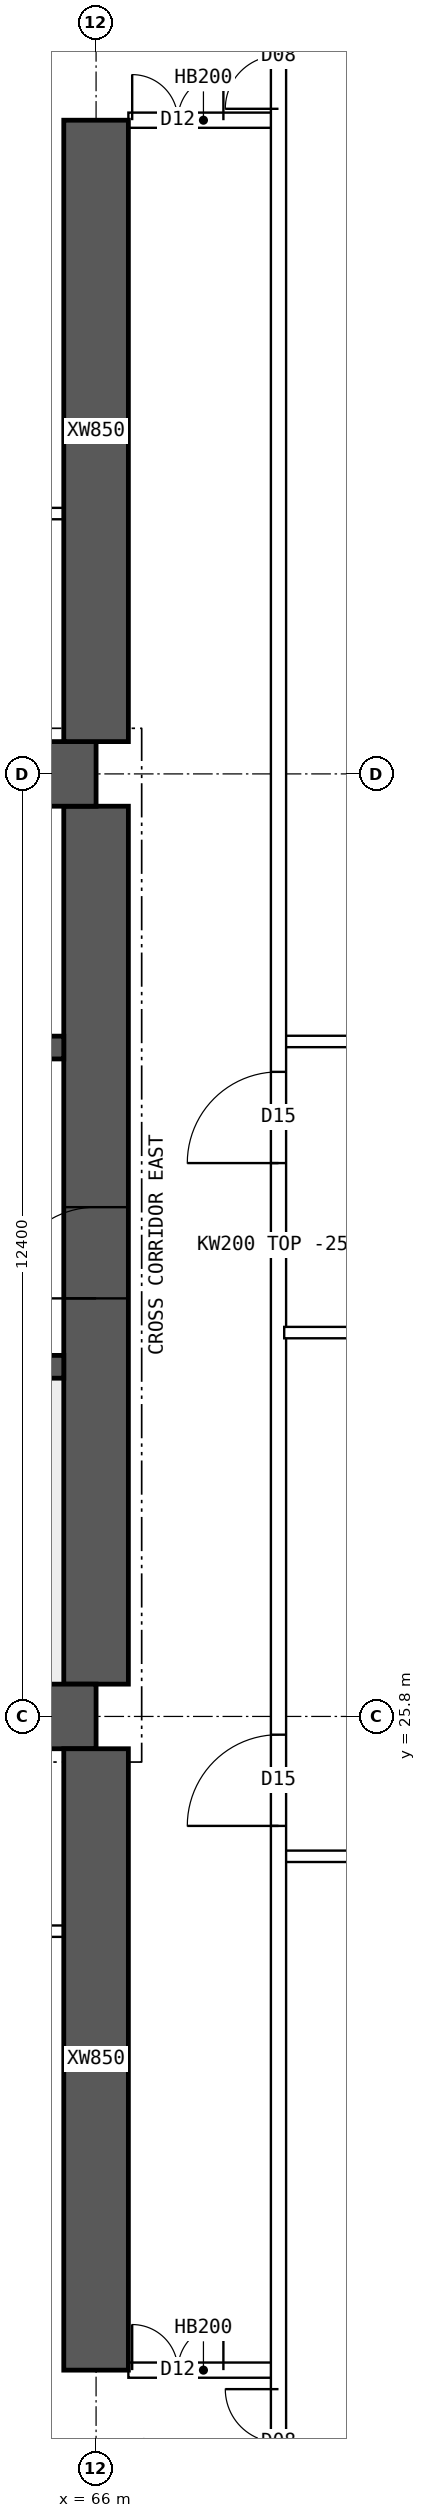
"""IFC4 building model, lengths in metres.
Left out: names, types, materials, properties, quantities, classifications, styles, units other than length and angle.
Written with IfcOpenShell. Run it as: python <this file> out.ifc"""

import sys

from ifc_helpers import new_model, si_unit, direction, frame, frame_2d, origin, place, context, subcontext, project, spatial, polyline, rectangle, outline, extrude, element, fill, save


model = new_model("IFC4")
c1 = context("Model", 3, precision=1e-05, world=origin(), true_north=direction((0.0, 1.0)))
c2 = subcontext(c1, "Body", "Model", "MODEL_VIEW")
j1 = project(units=[si_unit("LENGTHUNIT", "METRE"), si_unit("PLANEANGLEUNIT", "RADIAN")], contexts=[c1])
p1 = place(None, origin())
s1 = spatial("IfcSite", under=j1, at=p1, CompositionType="ELEMENT")
p2 = place(p1, origin())
s2 = spatial("IfcBuilding", under=s1, at=p2, CompositionType="ELEMENT")
p3 = place(p2, frame((0.0, 0.0, 156.1)))
s3 = spatial("IfcBuildingStorey", under=s2, at=p3, CompositionType="ELEMENT", Elevation=156.1)
for number, where, z_axis, x_axis in (
    (1, (18.0, 25.8, 0.0), (0.0, 0.0, 1.0), (1.0, 0.0, 0.0)),
    (2, (18.0, 38.2, 0.0), (0.0, 0.0, 1.0), (1.0, 0.0, 0.0)),
):
    element("IfcWall", number, at=place(p3, frame(where, z_axis=z_axis, x_axis=x_axis)), inside=s3, PredefinedType="SHEAR", context=c2, shape_type="SweptSolid", body=[
        extrude(rectangle(XDim=48.0, YDim=0.85, at=frame_2d((24.0, 0.0))), origin(), (0.0, 0.0, 1.0), 3.75),
    ])
p4 = place(p3, frame((66.0, 26.225, 0.0), z_axis=(0.0, 0.0, 1.0), x_axis=(0.0, 1.0, 0.0)))
e3 = element("IfcWall", 3, at=p4, inside=s3, PredefinedType="SHEAR", context=c2, shape_type="SweptSolid", body=[
    extrude(rectangle(XDim=11.55, YDim=0.85, at=frame_2d((5.775, 0.0))), origin(), (0.0, 0.0, 1.0), 3.75),
])
p5 = place(p4, frame((5.075, 0.0, 0.0)))
e4 = element("IfcOpeningElement", 4, at=p5, cuts=e3, PredefinedType="OPENING", context=c2, shape_type="SweptSolid", body=[
    extrude(rectangle(XDim=1.2, YDim=2.1, at=frame_2d((0.6, 1.05))), frame((0.0, 0.435, 0.0), z_axis=(0.0, -1.0, 0.0), x_axis=(1.0, 0.0, 0.0)), (0.0, 0.0, 1.0), 0.87),
])
p6 = place(p3, frame((18.425, 30.4, 0.0), z_axis=(0.0, 0.0, 1.0), x_axis=(1.0, 0.0, 0.0)))
e5 = element("IfcWall", 5, at=p6, inside=s3, PredefinedType="SHEAR", context=c2, shape_type="SweptSolid", body=[
    extrude(rectangle(XDim=47.15, YDim=0.3, at=frame_2d((23.575, 0.0))), origin(), (0.0, 0.0, 1.0), 3.75),
])
p7 = place(p6, frame((0.4, 0.0, 0.0)))
e6 = element("IfcOpeningElement", 6, at=p7, cuts=e5, PredefinedType="OPENING", context=c2, shape_type="SweptSolid", body=[
    extrude(rectangle(XDim=1.0, YDim=2.1, at=frame_2d((0.5, 1.05))), frame((0.0, 0.16, 0.0), z_axis=(0.0, -1.0, 0.0), x_axis=(1.0, 0.0, 0.0)), (0.0, 0.0, 1.0), 0.32),
])
p8 = place(p6, frame((45.75, 0.0, 0.0)))
e7 = element("IfcOpeningElement", 7, at=p8, cuts=e5, PredefinedType="OPENING", context=c2, shape_type="SweptSolid", body=[
    extrude(rectangle(XDim=1.0, YDim=2.1, at=frame_2d((0.5, 1.05))), frame((0.0, 0.16, 0.0), z_axis=(0.0, -1.0, 0.0), x_axis=(1.0, 0.0, 0.0)), (0.0, 0.0, 1.0), 0.32),
])
p9 = place(p6, frame((8.325, 0.0, 0.0)))
e8 = element("IfcOpeningElement", 8, at=p9, cuts=e5, PredefinedType="OPENING", context=c2, shape_type="SweptSolid", body=[
    extrude(rectangle(XDim=1.1, YDim=2.1, at=frame_2d((0.55, 1.05))), frame((0.0, 0.16, 0.0), z_axis=(0.0, -1.0, 0.0), x_axis=(1.0, 0.0, 0.0)), (0.0, 0.0, 1.0), 0.32),
])
p10 = place(p6, frame((10.925, 0.0, 0.0)))
e9 = element("IfcOpeningElement", 9, at=p10, cuts=e5, PredefinedType="OPENING", context=c2, shape_type="SweptSolid", body=[
    extrude(rectangle(XDim=1.1, YDim=2.1, at=frame_2d((0.55, 1.05))), frame((0.0, 0.16, 0.0), z_axis=(0.0, -1.0, 0.0), x_axis=(1.0, 0.0, 0.0)), (0.0, 0.0, 1.0), 0.32),
])
p11 = place(p6, frame((13.525, 0.0, 0.0)))
e10 = element("IfcOpeningElement", 10, at=p11, cuts=e5, PredefinedType="OPENING", context=c2, shape_type="SweptSolid", body=[
    extrude(rectangle(XDim=1.1, YDim=2.1, at=frame_2d((0.55, 1.05))), frame((0.0, 0.16, 0.0), z_axis=(0.0, -1.0, 0.0), x_axis=(1.0, 0.0, 0.0)), (0.0, 0.0, 1.0), 0.32),
])
p12 = place(p6, frame((16.125, 0.0, 0.0)))
e11 = element("IfcOpeningElement", 11, at=p12, cuts=e5, PredefinedType="OPENING", context=c2, shape_type="SweptSolid", body=[
    extrude(rectangle(XDim=1.1, YDim=2.1, at=frame_2d((0.55, 1.05))), frame((0.0, 0.16, 0.0), z_axis=(0.0, -1.0, 0.0), x_axis=(1.0, 0.0, 0.0)), (0.0, 0.0, 1.0), 0.32),
])
p13 = place(p6, frame((18.9, 0.0, 0.0)))
e12 = element("IfcOpeningElement", 12, at=p13, cuts=e5, PredefinedType="OPENING", context=c2, shape_type="SweptSolid", body=[
    extrude(rectangle(XDim=0.9, YDim=2.1, at=frame_2d((0.45, 1.05))), frame((0.0, 0.16, 0.0), z_axis=(0.0, -1.0, 0.0), x_axis=(1.0, 0.0, 0.0)), (0.0, 0.0, 1.0), 0.32),
])
p14 = place(p6, frame((30.192, 0.0, 0.0)))
e13 = element("IfcOpeningElement", 13, at=p14, cuts=e5, PredefinedType="OPENING", context=c2, shape_type="SweptSolid", body=[
    extrude(rectangle(XDim=1.1, YDim=2.1, at=frame_2d((0.55, 1.05))), frame((0.0, 0.16, 0.0), z_axis=(0.0, -1.0, 0.0), x_axis=(1.0, 0.0, 0.0)), (0.0, 0.0, 1.0), 0.32),
])
p15 = place(p6, frame((33.725, 0.0, 0.0)))
e14 = element("IfcOpeningElement", 14, at=p15, cuts=e5, PredefinedType="OPENING", context=c2, shape_type="SweptSolid", body=[
    extrude(rectangle(XDim=1.1, YDim=2.1, at=frame_2d((0.55, 1.05))), frame((0.0, 0.16, 0.0), z_axis=(0.0, -1.0, 0.0), x_axis=(1.0, 0.0, 0.0)), (0.0, 0.0, 1.0), 0.32),
])
p16 = place(p6, frame((37.258, 0.0, 0.0)))
e15 = element("IfcOpeningElement", 15, at=p16, cuts=e5, PredefinedType="OPENING", context=c2, shape_type="SweptSolid", body=[
    extrude(rectangle(XDim=1.1, YDim=2.1, at=frame_2d((0.55, 1.05))), frame((0.0, 0.16, 0.0), z_axis=(0.0, -1.0, 0.0), x_axis=(1.0, 0.0, 0.0)), (0.0, 0.0, 1.0), 0.32),
])
p17 = place(p3, frame((18.425, 34.6, 0.0), z_axis=(0.0, 0.0, 1.0), x_axis=(1.0, 0.0, 0.0)))
e16 = element("IfcWall", 16, at=p17, inside=s3, PredefinedType="SHEAR", context=c2, shape_type="SweptSolid", body=[
    extrude(rectangle(XDim=47.15, YDim=0.3, at=frame_2d((23.575, 0.0))), origin(), (0.0, 0.0, 1.0), 3.75),
])
p18 = place(p17, frame((0.9, 0.0, 0.0)))
e17 = element("IfcOpeningElement", 17, at=p18, cuts=e16, PredefinedType="OPENING", context=c2, shape_type="SweptSolid", body=[
    extrude(rectangle(XDim=1.1, YDim=2.1, at=frame_2d((0.55, 1.05))), frame((0.0, 0.16, 0.0), z_axis=(0.0, -1.0, 0.0), x_axis=(1.0, 0.0, 0.0)), (0.0, 0.0, 1.0), 0.32),
])
p19 = place(p17, frame((45.15, 0.0, 0.0)))
e18 = element("IfcOpeningElement", 18, at=p19, cuts=e16, PredefinedType="OPENING", context=c2, shape_type="SweptSolid", body=[
    extrude(rectangle(XDim=1.1, YDim=2.1, at=frame_2d((0.55, 1.05))), frame((0.0, 0.16, 0.0), z_axis=(0.0, -1.0, 0.0), x_axis=(1.0, 0.0, 0.0)), (0.0, 0.0, 1.0), 0.32),
])
p20 = place(p17, frame((4.175, 0.0, 0.0)))
e19 = element("IfcOpeningElement", 19, at=p20, cuts=e16, PredefinedType="OPENING", context=c2, shape_type="SweptSolid", body=[
    extrude(rectangle(XDim=0.9, YDim=2.1, at=frame_2d((0.45, 1.05))), frame((0.0, 0.16, 0.0), z_axis=(0.0, -1.0, 0.0), x_axis=(1.0, 0.0, 0.0)), (0.0, 0.0, 1.0), 0.32),
])
p21 = place(p17, frame((42.075, 0.0, 0.0)))
e20 = element("IfcOpeningElement", 20, at=p21, cuts=e16, PredefinedType="OPENING", context=c2, shape_type="SweptSolid", body=[
    extrude(rectangle(XDim=0.9, YDim=2.1, at=frame_2d((0.45, 1.05))), frame((0.0, 0.16, 0.0), z_axis=(0.0, -1.0, 0.0), x_axis=(1.0, 0.0, 0.0)), (0.0, 0.0, 1.0), 0.32),
])
p22 = place(p17, frame((8.95, 0.0, 0.0)))
e21 = element("IfcOpeningElement", 21, at=p22, cuts=e16, PredefinedType="OPENING", context=c2, shape_type="SweptSolid", body=[
    extrude(rectangle(XDim=0.9, YDim=2.1, at=frame_2d((0.45, 1.05))), frame((0.0, 0.16, 0.0), z_axis=(0.0, -1.0, 0.0), x_axis=(1.0, 0.0, 0.0)), (0.0, 0.0, 1.0), 0.32),
])
p23 = place(p17, frame((12.924, 0.0, 0.0)))
e22 = element("IfcOpeningElement", 22, at=p23, cuts=e16, PredefinedType="OPENING", context=c2, shape_type="SweptSolid", body=[
    extrude(rectangle(XDim=0.9, YDim=2.1, at=frame_2d((0.45, 1.05))), frame((0.0, 0.16, 0.0), z_axis=(0.0, -1.0, 0.0), x_axis=(1.0, 0.0, 0.0)), (0.0, 0.0, 1.0), 0.32),
])
p24 = place(p17, frame((16.571, 0.0, 0.0)))
e23 = element("IfcOpeningElement", 23, at=p24, cuts=e16, PredefinedType="OPENING", context=c2, shape_type="SweptSolid", body=[
    extrude(rectangle(XDim=0.9, YDim=2.1, at=frame_2d((0.45, 1.05))), frame((0.0, 0.16, 0.0), z_axis=(0.0, -1.0, 0.0), x_axis=(1.0, 0.0, 0.0)), (0.0, 0.0, 1.0), 0.32),
])
p25 = place(p17, frame((20.33, 0.0, 0.0)))
e24 = element("IfcOpeningElement", 24, at=p25, cuts=e16, PredefinedType="OPENING", context=c2, shape_type="SweptSolid", body=[
    extrude(rectangle(XDim=0.9, YDim=2.1, at=frame_2d((0.45, 1.05))), frame((0.0, 0.16, 0.0), z_axis=(0.0, -1.0, 0.0), x_axis=(1.0, 0.0, 0.0)), (0.0, 0.0, 1.0), 0.32),
])
p26 = place(p17, frame((24.736, 0.0, 0.0)))
e25 = element("IfcOpeningElement", 25, at=p26, cuts=e16, PredefinedType="OPENING", context=c2, shape_type="SweptSolid", body=[
    extrude(rectangle(XDim=0.9, YDim=2.1, at=frame_2d((0.45, 1.05))), frame((0.0, 0.16, 0.0), z_axis=(0.0, -1.0, 0.0), x_axis=(1.0, 0.0, 0.0)), (0.0, 0.0, 1.0), 0.32),
])
p27 = place(p17, frame((27.533, 0.0, 0.0)))
e26 = element("IfcOpeningElement", 26, at=p27, cuts=e16, PredefinedType="OPENING", context=c2, shape_type="SweptSolid", body=[
    extrude(rectangle(XDim=0.9, YDim=2.1, at=frame_2d((0.45, 1.05))), frame((0.0, 0.16, 0.0), z_axis=(0.0, -1.0, 0.0), x_axis=(1.0, 0.0, 0.0)), (0.0, 0.0, 1.0), 0.32),
])
p28 = place(p17, frame((29.906, 0.0, 0.0)))
e27 = element("IfcOpeningElement", 27, at=p28, cuts=e16, PredefinedType="OPENING", context=c2, shape_type="SweptSolid", body=[
    extrude(rectangle(XDim=0.9, YDim=2.1, at=frame_2d((0.45, 1.05))), frame((0.0, 0.16, 0.0), z_axis=(0.0, -1.0, 0.0), x_axis=(1.0, 0.0, 0.0)), (0.0, 0.0, 1.0), 0.32),
])
p29 = place(p17, frame((35.376, 0.0, 0.0)))
e28 = element("IfcOpeningElement", 28, at=p29, cuts=e16, PredefinedType="OPENING", context=c2, shape_type="SweptSolid", body=[
    extrude(rectangle(XDim=0.9, YDim=2.1, at=frame_2d((0.45, 1.05))), frame((0.0, 0.16, 0.0), z_axis=(0.0, -1.0, 0.0), x_axis=(1.0, 0.0, 0.0)), (0.0, 0.0, 1.0), 0.32),
])
for number, where, z_axis, x_axis in (
    (29, (66.0, 17.2, 0.0), (0.0, 0.0, 1.0), (0.0, 1.0, 0.0)),
    (30, (66.0, 38.625, 0.0), (0.0, 0.0, 1.0), (0.0, 1.0, 0.0)),
):
    element("IfcWall", number, at=place(p3, frame(where, z_axis=z_axis, x_axis=x_axis)), inside=s3, PredefinedType="SHEAR", context=c2, shape_type="SweptSolid", body=[
        extrude(rectangle(XDim=8.175, YDim=0.85, at=frame_2d((4.087, 0.0))), origin(), (0.0, 0.0, 1.0), 3.75),
    ])
p30 = place(p3, frame((66.425, 17.2, 0.0), z_axis=(0.0, 0.0, 1.0), x_axis=(1.0, 0.0, 0.0)))
e31 = element("IfcWall", 31, at=p30, inside=s3, PredefinedType="SOLIDWALL", context=c2, shape_type="SweptSolid", body=[
    extrude(rectangle(XDim=1.975, YDim=0.2, at=frame_2d((0.987, 0.0))), origin(), (0.0, 0.0, 1.0), 3.5),
])
p31 = place(p30, frame((0.05, 0.0, 0.0)))
e32 = element("IfcOpeningElement", 32, at=p31, cuts=e31, PredefinedType="OPENING", context=c2, shape_type="SweptSolid", body=[
    extrude(rectangle(XDim=1.2, YDim=2.1, at=frame_2d((0.6, 1.05))), frame((0.0, 0.11, 0.0), z_axis=(0.0, -1.0, 0.0), x_axis=(1.0, 0.0, 0.0)), (0.0, 0.0, 1.0), 0.22),
])
p32 = place(p3, frame((66.425, 46.8, 0.0), z_axis=(0.0, 0.0, 1.0), x_axis=(1.0, 0.0, 0.0)))
e33 = element("IfcWall", 33, at=p32, inside=s3, PredefinedType="SOLIDWALL", context=c2, shape_type="SweptSolid", body=[
    extrude(rectangle(XDim=1.975, YDim=0.2, at=frame_2d((0.987, 0.0))), origin(), (0.0, 0.0, 1.0), 3.5),
])
p33 = place(p32, frame((0.05, 0.0, 0.0)))
e34 = element("IfcOpeningElement", 34, at=p33, cuts=e33, PredefinedType="OPENING", context=c2, shape_type="SweptSolid", body=[
    extrude(rectangle(XDim=1.2, YDim=2.1, at=frame_2d((0.6, 1.05))), frame((0.0, 0.11, 0.0), z_axis=(0.0, -1.0, 0.0), x_axis=(1.0, 0.0, 0.0)), (0.0, 0.0, 1.0), 0.22),
])
p34 = place(p3, frame((60.075, 22.975, 0.0), z_axis=(0.0, 0.0, 1.0), x_axis=(1.0, 0.0, 0.0)))
e35 = element("IfcWall", 35, at=p34, inside=s3, PredefinedType="PARTITIONING", context=c2, shape_type="SweptSolid", body=[
    extrude(rectangle(XDim=5.5, YDim=0.15, at=frame_2d((2.75, 0.0))), origin(), (0.0, 0.0, 1.0), 3.5),
])
p35 = place(p34, frame((0.4, 0.0, 0.0)))
e36 = element("IfcOpeningElement", 36, at=p35, cuts=e35, PredefinedType="OPENING", context=c2, shape_type="SweptSolid", body=[
    extrude(rectangle(XDim=1.0, YDim=2.1, at=frame_2d((0.5, 1.05))), frame((0.0, 0.085, 0.0), z_axis=(0.0, -1.0, 0.0), x_axis=(1.0, 0.0, 0.0)), (0.0, 0.0, 1.0), 0.17),
])
p36 = place(p3, frame((65.575, 41.625, 0.0), z_axis=(0.0, 0.0, 1.0), x_axis=(-1.0, 0.0, 0.0)))
e37 = element("IfcWall", 37, at=p36, inside=s3, PredefinedType="PARTITIONING", context=c2, shape_type="SweptSolid", body=[
    extrude(rectangle(XDim=5.5, YDim=0.15, at=frame_2d((2.75, 0.0))), origin(), (0.0, 0.0, 1.0), 3.5),
])
p37 = place(p36, frame((0.4, 0.0, 0.0)))
e38 = element("IfcOpeningElement", 38, at=p37, cuts=e37, PredefinedType="OPENING", context=c2, shape_type="SweptSolid", body=[
    extrude(rectangle(XDim=1.0, YDim=2.1, at=frame_2d((0.5, 1.05))), frame((0.0, 0.085, 0.0), z_axis=(0.0, -1.0, 0.0), x_axis=(1.0, 0.0, 0.0)), (0.0, 0.0, 1.0), 0.17),
])
p38 = place(p3, frame((68.475, 30.85, 0.0), z_axis=(0.0, 0.0, 1.0), x_axis=(1.0, 0.0, 0.0)))
e39 = element("IfcWall", 39, at=p38, inside=s3, PredefinedType="PARTITIONING", context=c2, shape_type="SweptSolid", body=[
    extrude(outline(polyline([(0.0, 0.0), (6.82, 0.0), (6.82, 3.5), (3.827, 3.5), (3.825, 3.05), (3.227, 3.05), (3.225, 3.5), (0.0, 3.5), (0.0, 0.0)])), frame((0.0, 0.075, 0.0), z_axis=(0.0, -1.0, 0.0), x_axis=(1.0, 0.0, 0.0)), (0.0, 0.0, 1.0), 0.15),
])
p39 = place(p3, frame((68.4, 10.446, 0.0), z_axis=(0.0, 0.0, 1.0), x_axis=(0.0, 1.0, 0.0)))
e40 = element("IfcWall", 40, at=p39, inside=s3, PredefinedType="SOLIDWALL", context=c2, shape_type="SweptSolid", body=[
    extrude(rectangle(XDim=43.107, YDim=0.2, at=frame_2d((21.554, 0.0))), origin(), (0.0, 0.0, 1.0), 3.5),
])
p40 = place(p39, frame((13.914, 0.0, 0.0)))
e41 = element("IfcOpeningElement", 41, at=p40, cuts=e40, PredefinedType="OPENING", context=c2, shape_type="SweptSolid", body=[
    extrude(rectangle(XDim=1.2, YDim=2.1, at=frame_2d((0.6, 1.05))), frame((0.0, 0.11, 0.0), z_axis=(0.0, -1.0, 0.0), x_axis=(1.0, 0.0, 0.0)), (0.0, 0.0, 1.0), 0.22),
])
p41 = place(p39, frame((22.634, 0.0, 0.0)))
e42 = element("IfcOpeningElement", 42, at=p41, cuts=e40, PredefinedType="OPENING", context=c2, shape_type="SweptSolid", body=[
    extrude(rectangle(XDim=1.2, YDim=2.1, at=frame_2d((0.6, 1.05))), frame((0.0, 0.11, 0.0), z_axis=(0.0, -1.0, 0.0), x_axis=(1.0, 0.0, 0.0)), (0.0, 0.0, 1.0), 0.22),
])
p42 = place(p39, frame((5.104, 0.0, 0.0)))
e43 = element("IfcOpeningElement", 43, at=p42, cuts=e40, PredefinedType="OPENING", context=c2, shape_type="SweptSolid", body=[
    extrude(rectangle(XDim=1.4, YDim=2.1, at=frame_2d((0.7, 1.05))), frame((0.0, 0.11, 0.0), z_axis=(0.0, -1.0, 0.0), x_axis=(1.0, 0.0, 0.0)), (0.0, 0.0, 1.0), 0.22),
])
p43 = place(p39, frame((36.504, 0.0, 0.0)))
e44 = element("IfcOpeningElement", 44, at=p43, cuts=e40, PredefinedType="OPENING", context=c2, shape_type="SweptSolid", body=[
    extrude(rectangle(XDim=1.4, YDim=2.1, at=frame_2d((0.7, 1.05))), frame((0.0, 0.11, 0.0), z_axis=(0.0, -1.0, 0.0), x_axis=(1.0, 0.0, 0.0)), (0.0, 0.0, 1.0), 0.22),
])
p44 = place(p3, frame((68.475, 23.96, 0.0), z_axis=(0.0, 0.0, 1.0), x_axis=(1.0, 0.0, 0.0)))
e45 = element("IfcWall", 45, at=p44, inside=s3, PredefinedType="PARTITIONING", context=c2, shape_type="SweptSolid", body=[
    extrude(rectangle(XDim=6.82, YDim=0.15, at=frame_2d((3.41, 0.0))), origin(), (0.0, 0.0, 1.0), 3.5),
])
p45 = place(p3, frame((68.475, 34.68, 0.0), z_axis=(0.0, 0.0, 1.0), x_axis=(1.0, 0.0, 0.0)))
e46 = element("IfcWall", 46, at=p45, inside=s3, PredefinedType="PARTITIONING", context=c2, shape_type="SweptSolid", body=[
    extrude(outline(polyline([(0.0, 0.0), (6.82, 0.0), (6.82, 3.5), (3.827, 3.5), (3.825, 3.05), (3.227, 3.05), (3.225, 3.5), (0.0, 3.5), (0.0, 0.0)])), frame((0.0, 0.075, 0.0), z_axis=(0.0, -1.0, 0.0), x_axis=(1.0, 0.0, 0.0)), (0.0, 0.0, 1.0), 0.15),
])
p46 = place(p5, origin())
e47 = element("IfcDoor", 47, at=p46, inside=s3, OperationType="SINGLE_SWING_LEFT", PredefinedType="DOOR", context=c2, shape_type="SweptSolid", body=[
    extrude(rectangle(XDim=1.2, YDim=2.1, at=frame_2d((0.6, 1.05))), frame((0.0, 0.025, 0.0), z_axis=(0.0, -1.0, 0.0), x_axis=(1.0, 0.0, 0.0)), (0.0, 0.0, 1.0), 0.05),
])
fill(e4, e47)
p47 = place(p31, origin())
e48 = element("IfcDoor", 48, at=p47, inside=s3, OperationType="DOUBLE_DOOR_SINGLE_SWING", PredefinedType="DOOR", context=c2, shape_type="SweptSolid", body=[
    extrude(rectangle(XDim=1.2, YDim=2.1, at=frame_2d((0.6, 1.05))), frame((0.0, 0.025, 0.0), z_axis=(0.0, -1.0, 0.0), x_axis=(1.0, 0.0, 0.0)), (0.0, 0.0, 1.0), 0.05),
])
fill(e32, e48)
p48 = place(p33, origin())
e49 = element("IfcDoor", 49, at=p48, inside=s3, OperationType="DOUBLE_DOOR_SINGLE_SWING", PredefinedType="DOOR", context=c2, shape_type="SweptSolid", body=[
    extrude(rectangle(XDim=1.2, YDim=2.1, at=frame_2d((0.6, 1.05))), frame((0.0, 0.025, 0.0), z_axis=(0.0, -1.0, 0.0), x_axis=(1.0, 0.0, 0.0)), (0.0, 0.0, 1.0), 0.05),
])
fill(e34, e49)
p49 = place(p40, origin())
e50 = element("IfcDoor", 50, at=p49, inside=s3, OperationType="SINGLE_SWING_LEFT", PredefinedType="DOOR", context=c2, shape_type="SweptSolid", body=[
    extrude(rectangle(XDim=1.2, YDim=2.1, at=frame_2d((0.6, 1.05))), frame((0.0, 0.025, 0.0), z_axis=(0.0, -1.0, 0.0), x_axis=(1.0, 0.0, 0.0)), (0.0, 0.0, 1.0), 0.05),
])
fill(e41, e50)
p50 = place(p41, origin())
e51 = element("IfcDoor", 51, at=p50, inside=s3, OperationType="SINGLE_SWING_LEFT", PredefinedType="DOOR", context=c2, shape_type="SweptSolid", body=[
    extrude(rectangle(XDim=1.2, YDim=2.1, at=frame_2d((0.6, 1.05))), frame((0.0, 0.025, 0.0), z_axis=(0.0, -1.0, 0.0), x_axis=(1.0, 0.0, 0.0)), (0.0, 0.0, 1.0), 0.05),
])
fill(e42, e51)
p51 = place(p42, origin())
e52 = element("IfcDoor", 52, at=p51, inside=s3, OperationType="DOUBLE_DOOR_SINGLE_SWING", PredefinedType="DOOR", context=c2, shape_type="SweptSolid", body=[
    extrude(rectangle(XDim=1.4, YDim=2.1, at=frame_2d((0.7, 1.05))), frame((0.0, 0.025, 0.0), z_axis=(0.0, -1.0, 0.0), x_axis=(1.0, 0.0, 0.0)), (0.0, 0.0, 1.0), 0.05),
])
fill(e43, e52)
p52 = place(p43, origin())
e53 = element("IfcDoor", 53, at=p52, inside=s3, OperationType="DOUBLE_DOOR_SINGLE_SWING", PredefinedType="DOOR", context=c2, shape_type="SweptSolid", body=[
    extrude(rectangle(XDim=1.4, YDim=2.1, at=frame_2d((0.7, 1.05))), frame((0.0, 0.025, 0.0), z_axis=(0.0, -1.0, 0.0), x_axis=(1.0, 0.0, 0.0)), (0.0, 0.0, 1.0), 0.05),
])
fill(e44, e53)
save(model, sys.argv[1])
